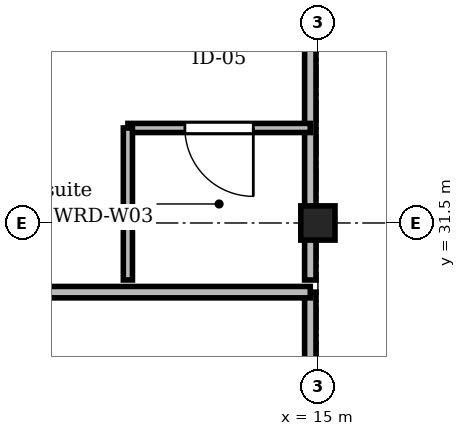
"""IFC4 building model, lengths in metres.
Left out: names, types, materials, properties, quantities, classifications, styles, units other than length and angle.
Written with IfcOpenShell. Run it as: python <this file> out.ifc"""

import sys

from ifc_helpers import new_model, si_unit, direction, frame, frame_2d, origin, origin_2d, place, context, subcontext, project, spatial, rectangle, extrude, element, fill, save


model = new_model("IFC4")
c1 = context("Model", 3, precision=1e-05, world=origin(), true_north=direction((0.0, 1.0)))
c2 = subcontext(c1, "Body", "Model", "MODEL_VIEW")
j1 = project(units=[si_unit("LENGTHUNIT", "METRE"), si_unit("PLANEANGLEUNIT", "RADIAN")], contexts=[c1])
p1 = place(None, origin())
s1 = spatial("IfcSite", under=j1, at=p1, CompositionType="ELEMENT")
p2 = place(p1, origin())
s2 = spatial("IfcBuilding", under=s1, at=p2, CompositionType="ELEMENT")
p3 = place(p2, frame((0.0, 0.0, 30.0)))
s3 = spatial("IfcBuildingStorey", under=s2, at=p3, CompositionType="ELEMENT", Elevation=30.0)
p4 = place(p3, frame((15.0, 31.5, 0.0), z_axis=(0.0, 0.0, 1.0), x_axis=(1.0, 0.0, 0.0)))
e1 = element("IfcColumn", 1, at=p4, inside=s3, PredefinedType="COLUMN", context=c2, shape_type="SweptSolid", body=[
    extrude(rectangle(XDim=0.45, YDim=0.45, at=origin_2d()), origin(), (0.0, 0.0, 1.0), 4.05),
])
p5 = place(p3, frame((14.9, 23.09, 0.0), z_axis=(0.0, 0.0, 1.0), x_axis=(0.0, 1.0, 0.0)))
e2 = element("IfcWall", 2, at=p5, inside=s3, PredefinedType="PARTITIONING", context=c2, shape_type="SweptSolid", body=[
    extrude(rectangle(XDim=7.5, YDim=0.15, at=frame_2d((3.75, 0.0))), origin(), (0.0, 0.0, 1.0), 3.815),
])
p6 = place(p5, frame((3.075, 0.0, 0.0)))
e3 = element("IfcOpeningElement", 3, at=p6, cuts=e2, PredefinedType="OPENING", context=c2, shape_type="SweptSolid", body=[
    extrude(rectangle(XDim=1.35, YDim=2.25, at=frame_2d((0.675, 1.125))), frame((0.0, 0.085, 0.0), z_axis=(0.0, -1.0, 0.0), x_axis=(1.0, 0.0, 0.0)), (0.0, 0.0, 1.0), 0.17),
])
p7 = place(p3, frame((14.9, 30.75, 0.0), z_axis=(0.0, 0.0, 1.0), x_axis=(0.0, 1.0, 0.0)))
e4 = element("IfcWall", 4, at=p7, inside=s3, PredefinedType="PARTITIONING", context=c2, shape_type="SweptSolid", body=[
    extrude(rectangle(XDim=7.5, YDim=0.15, at=frame_2d((3.75, 0.0))), origin(), (0.0, 0.0, 1.0), 3.815),
])
p8 = place(p7, frame((3.64, 0.0, 0.0)))
e5 = element("IfcOpeningElement", 5, at=p8, cuts=e4, PredefinedType="OPENING", context=c2, shape_type="SweptSolid", body=[
    extrude(rectangle(XDim=1.35, YDim=2.25, at=frame_2d((0.675, 1.125))), frame((0.0, 0.085, 0.0), z_axis=(0.0, -1.0, 0.0), x_axis=(1.0, 0.0, 0.0)), (0.0, 0.0, 1.0), 0.17),
])
p9 = place(p3, frame((14.9, 32.75, 0.0), z_axis=(0.0, 0.0, 1.0), x_axis=(-1.0, 0.0, 0.0)))
e6 = element("IfcWall", 6, at=p9, inside=s3, PredefinedType="PARTITIONING", context=c2, shape_type="SweptSolid", body=[
    extrude(rectangle(XDim=2.4, YDim=0.12, at=frame_2d((1.2, 0.0))), origin(), (0.0, 0.0, 1.0), 3.815),
])
p10 = place(p9, frame((0.75, 0.0, 0.0)))
e7 = element("IfcOpeningElement", 7, at=p10, cuts=e6, PredefinedType="OPENING", context=c2, shape_type="SweptSolid", body=[
    extrude(rectangle(XDim=0.9, YDim=2.1, at=frame_2d((0.45, 1.05))), frame((0.0, 0.07, 0.0), z_axis=(0.0, -1.0, 0.0), x_axis=(1.0, 0.0, 0.0)), (0.0, 0.0, 1.0), 0.14),
])
p11 = place(p3, frame((12.5, 30.75, 0.0), z_axis=(0.0, 0.0, 1.0), x_axis=(0.0, 1.0, 0.0)))
e8 = element("IfcWall", 8, at=p11, inside=s3, PredefinedType="PARTITIONING", context=c2, shape_type="SweptSolid", body=[
    extrude(rectangle(XDim=2.0, YDim=0.12, at=frame_2d((1.0, 0.0))), origin(), (0.0, 0.0, 1.0), 3.815),
])
p12 = place(p3, frame((0.35, 30.59, 0.0), z_axis=(0.0, 0.0, 1.0), x_axis=(1.0, 0.0, 0.0)))
e9 = element("IfcWall", 9, at=p12, inside=s3, PredefinedType="PARTITIONING", context=c2, shape_type="SweptSolid", body=[
    extrude(rectangle(XDim=14.55, YDim=0.15, at=frame_2d((7.275, 0.0))), origin(), (0.0, 0.0, 1.0), 3.815),
])
p13 = place(p10, origin())
e10 = element("IfcDoor", 10, at=p13, inside=s3, OperationType="SINGLE_SWING_LEFT", PredefinedType="DOOR", context=c2, shape_type="SweptSolid", body=[
    extrude(rectangle(XDim=0.9, YDim=2.1, at=frame_2d((0.45, 1.05))), frame((0.0, 0.025, 0.0), z_axis=(0.0, -1.0, 0.0), x_axis=(1.0, 0.0, 0.0)), (0.0, 0.0, 1.0), 0.05),
])
fill(e7, e10)
save(model, sys.argv[1])
